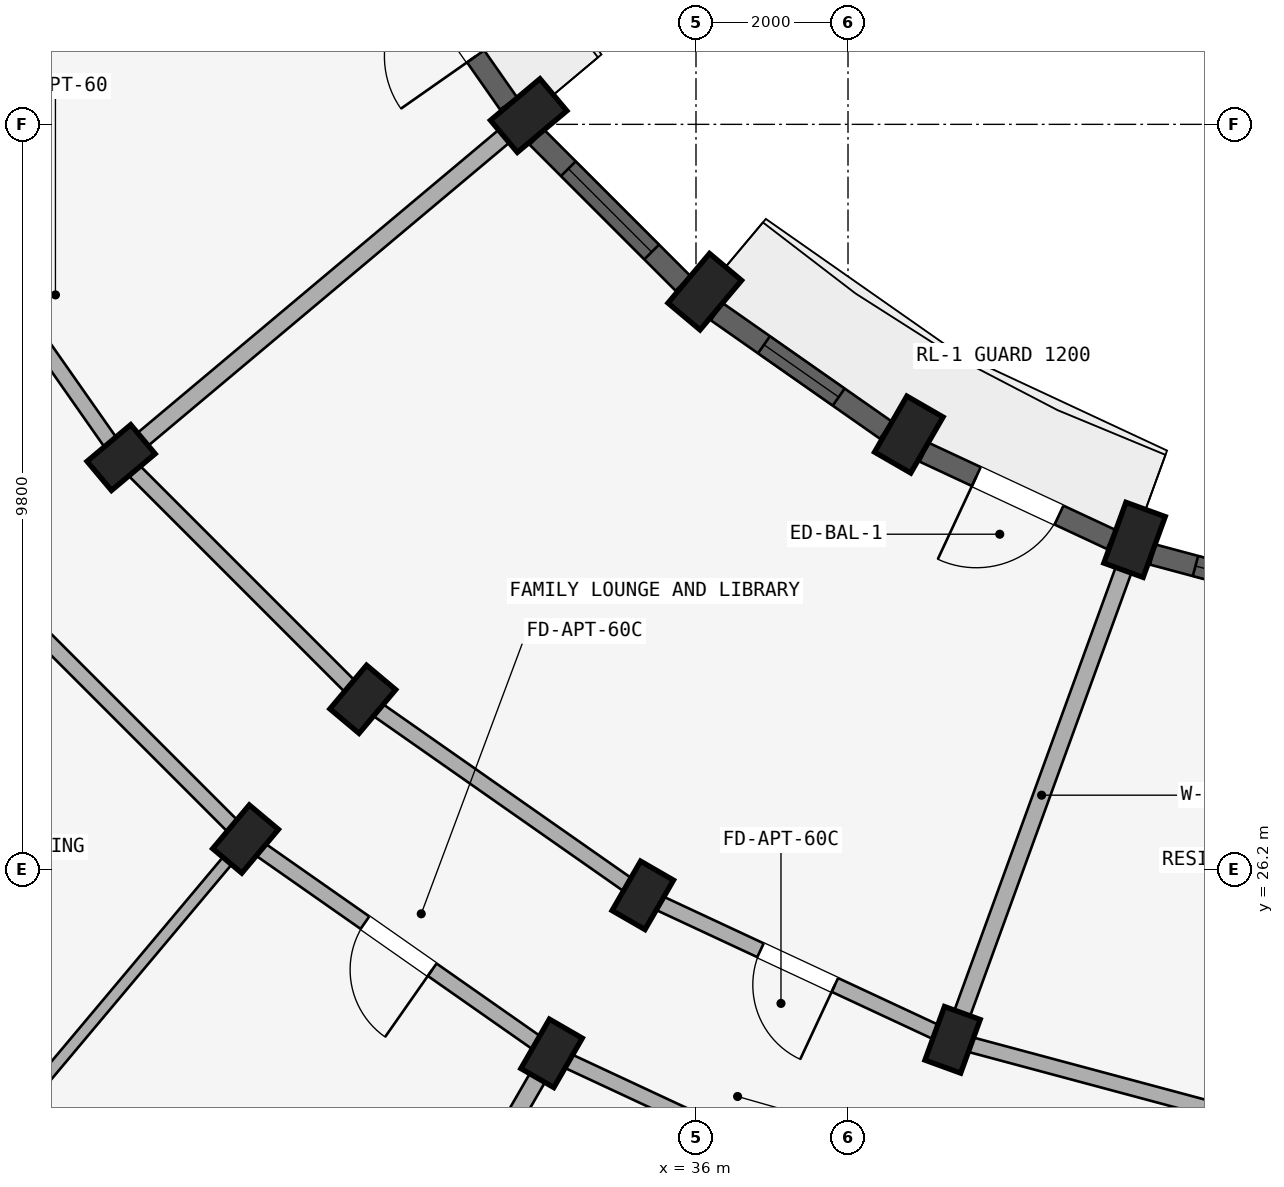
"""IFC4 building model, lengths in metres.
Left out: names, types, materials, properties, quantities, classifications, styles, units other than length and angle.
Written with IfcOpenShell. Run it as: python <this file> out.ifc"""

import sys

from ifc_helpers import new_model, si_unit, direction, frame, frame_2d, origin, origin_2d, place, context, subcontext, project, spatial, rectangle, extrude, element, fill, save


model = new_model("IFC4")
c1 = context("Model", 3, precision=1e-05, world=origin(), true_north=direction((0.0, 1.0)))
c2 = subcontext(c1, "Body", "Model", "MODEL_VIEW")
j1 = project(units=[si_unit("LENGTHUNIT", "METRE"), si_unit("PLANEANGLEUNIT", "RADIAN")], contexts=[c1])
p1 = place(None, origin())
s1 = spatial("IfcSite", under=j1, at=p1, CompositionType="ELEMENT")
p2 = place(p1, origin())
s2 = spatial("IfcBuilding", under=s1, at=p2, CompositionType="ELEMENT")
p3 = place(p2, frame((0.0, 0.0, 8.7)))
s3 = spatial("IfcBuildingStorey", under=s2, at=p3, CompositionType="ELEMENT", Elevation=8.7)
p4 = place(p3, frame((41.77, 30.534, 0.0), z_axis=(0.0, 0.0, 1.0), x_axis=(-0.939692620786, 0.342020143326, 0.0)))
e1 = element("IfcColumn", 1, at=p4, inside=s3, PredefinedType="COLUMN", context=c2, shape_type="SweptSolid", body=[
    extrude(rectangle(XDim=0.55, YDim=0.85, at=origin_2d()), origin(), (0.0, 0.0, 1.0), 2.93),
])
p5 = place(p3, frame((39.376, 23.956, 0.0), z_axis=(0.0, 0.0, 1.0), x_axis=(-0.939692620786, 0.342020143326, 0.0)))
e2 = element("IfcColumn", 2, at=p5, inside=s3, PredefinedType="COLUMN", context=c2, shape_type="SweptSolid", body=[
    extrude(rectangle(XDim=0.5, YDim=0.75, at=origin_2d()), origin(), (0.0, 0.0, 1.0), 2.93),
])
p6 = place(p3, frame((38.8, 31.919, 0.0), z_axis=(0.0, 0.0, 1.0), x_axis=(-0.866025403784, 0.5, 0.0)))
e3 = element("IfcColumn", 3, at=p6, inside=s3, PredefinedType="COLUMN", context=c2, shape_type="SweptSolid", body=[
    extrude(rectangle(XDim=0.55, YDim=0.85, at=origin_2d()), origin(), (0.0, 0.0, 1.0), 2.93),
])
for number, where, z_axis, x_axis in (
    (4, (35.3, 25.856, 0.0), (0.0, 0.0, 1.0), (-0.866, 0.5, 0.0)),
    (5, (34.1, 23.778, 0.0), (0.0, 0.0, 1.0), (-0.866, 0.5, 0.0)),
):
    element("IfcColumn", number, at=place(p3, frame(where, z_axis=z_axis, x_axis=x_axis)), inside=s3, PredefinedType="COLUMN", context=c2, shape_type="SweptSolid", body=[
        extrude(rectangle(XDim=0.5, YDim=0.75, at=origin_2d()), origin(), (0.0, 0.0, 1.0), 2.93),
    ])
p7 = place(p3, frame((36.115, 33.798, 0.0), z_axis=(0.0, 0.0, 1.0), x_axis=(-0.766044443119, 0.642787609687, 0.0)))
e6 = element("IfcColumn", 6, at=p7, inside=s3, PredefinedType="COLUMN", context=c2, shape_type="SweptSolid", body=[
    extrude(rectangle(XDim=0.55, YDim=0.85, at=origin_2d()), origin(), (0.0, 0.0, 1.0), 2.93),
])
for number, where, z_axis, x_axis in (
    (7, (31.616, 28.436, 0.0), (0.0, 0.0, 1.0), (-0.766, 0.643, 0.0)),
    (8, (30.073, 26.598, 0.0), (0.0, 0.0, 1.0), (-0.766, 0.643, 0.0)),
):
    element("IfcColumn", number, at=place(p3, frame(where, z_axis=z_axis, x_axis=x_axis)), inside=s3, PredefinedType="COLUMN", context=c2, shape_type="SweptSolid", body=[
        extrude(rectangle(XDim=0.5, YDim=0.75, at=origin_2d()), origin(), (0.0, 0.0, 1.0), 2.93),
    ])
p8 = place(p3, frame((33.798, 36.115, 0.0), z_axis=(0.0, 0.0, 1.0), x_axis=(-0.642787609687, 0.766044443119, 0.0)))
e9 = element("IfcColumn", 9, at=p8, inside=s3, PredefinedType="COLUMN", context=c2, shape_type="SweptSolid", body=[
    extrude(rectangle(XDim=0.55, YDim=0.85, at=origin_2d()), origin(), (0.0, 0.0, 1.0), 2.93),
])
p9 = place(p3, frame((28.436, 31.616, 0.0), z_axis=(0.0, 0.0, 1.0), x_axis=(-0.642787609687, 0.766044443119, 0.0)))
e10 = element("IfcColumn", 10, at=p9, inside=s3, PredefinedType="COLUMN", context=c2, shape_type="SweptSolid", body=[
    extrude(rectangle(XDim=0.5, YDim=0.75, at=origin_2d()), origin(), (0.0, 0.0, 1.0), 2.93),
])
p10 = place(p3, frame((43.72, 22.792, 0.0), z_axis=(0.0, 0.0, 1.0), x_axis=(-0.965934240054, 0.258787642463, 0.0)))
e11 = element("IfcWall", 11, at=p10, inside=s3, PredefinedType="STANDARD", context=c2, shape_type="SweptSolid", body=[
    extrude(rectangle(XDim=4.497, YDim=0.2, at=frame_2d((2.249, 0.0))), origin(), (0.0, 0.0, 1.0), 2.372),
])
p11 = place(p3, frame((39.376, 23.956, 0.0), z_axis=(0.0, 0.0, 1.0), x_axis=(-0.906307919131, 0.422617978463, 0.0)))
e12 = element("IfcWall", 12, at=p11, inside=s3, PredefinedType="STANDARD", context=c2, shape_type="SweptSolid", body=[
    extrude(rectangle(XDim=4.497, YDim=0.2, at=frame_2d((2.249, 0.0))), origin(), (0.0, 0.0, 1.0), 2.372),
])
p12 = place(p11, frame((1.709, 0.0, 0.0)))
e13 = element("IfcOpeningElement", 13, at=p12, cuts=e12, PredefinedType="OPENING", context=c2, shape_type="SweptSolid", body=[
    extrude(rectangle(XDim=1.08, YDim=2.15, at=frame_2d((0.54, 1.075))), frame((0.0, 0.11, 0.0), z_axis=(0.0, -1.0, 0.0), x_axis=(1.0, 0.0, 0.0)), (0.0, 0.0, 1.0), 0.22),
])
p13 = place(p3, frame((38.555, 21.701, 0.0), z_axis=(0.0, 0.0, 1.0), x_axis=(-0.906302381024, 0.422629854778, 0.0)))
e14 = element("IfcWall", 14, at=p13, inside=s3, PredefinedType="STANDARD", context=c2, shape_type="SweptSolid", body=[
    extrude(rectangle(XDim=4.915, YDim=0.2, at=frame_2d((2.458, 0.0))), origin(), (0.0, 0.0, 1.0), 2.372),
])
p14 = place(p13, frame((1.938, 0.0, 0.0)))
e15 = element("IfcOpeningElement", 15, at=p14, cuts=e14, PredefinedType="OPENING", context=c2, shape_type="SweptSolid", body=[
    extrude(rectangle(XDim=1.04, YDim=2.15, at=frame_2d((0.52, 1.075))), frame((0.0, 0.11, 0.0), z_axis=(0.0, -1.0, 0.0), x_axis=(1.0, 0.0, 0.0)), (0.0, 0.0, 1.0), 0.22),
])
p15 = place(p3, frame((35.3, 25.856, 0.0), z_axis=(0.0, 0.0, 1.0), x_axis=(-0.819155404658, 0.573571637217, 0.0)))
e16 = element("IfcWall", 16, at=p15, inside=s3, PredefinedType="STANDARD", context=c2, shape_type="SweptSolid", body=[
    extrude(rectangle(XDim=4.497, YDim=0.2, at=frame_2d((2.249, 0.0))), origin(), (0.0, 0.0, 1.0), 2.372),
])
p16 = place(p3, frame((34.1, 23.778, 0.0), z_axis=(0.0, 0.0, 1.0), x_axis=(-0.819140911474, 0.573592335331, 0.0)))
e17 = element("IfcWall", 17, at=p16, inside=s3, PredefinedType="STANDARD", context=c2, shape_type="SweptSolid", body=[
    extrude(rectangle(XDim=4.916, YDim=0.2, at=frame_2d((2.458, 0.0))), origin(), (0.0, 0.0, 1.0), 2.372),
])
p17 = place(p16, frame((1.918, 0.0, 0.0)))
e18 = element("IfcOpeningElement", 18, at=p17, cuts=e17, PredefinedType="OPENING", context=c2, shape_type="SweptSolid", body=[
    extrude(rectangle(XDim=1.08, YDim=2.15, at=frame_2d((0.54, 1.075))), frame((0.0, 0.11, 0.0), z_axis=(0.0, -1.0, 0.0), x_axis=(1.0, 0.0, 0.0)), (0.0, 0.0, 1.0), 0.22),
])
p18 = place(p3, frame((31.616, 28.436, 0.0), z_axis=(0.0, 0.0, 1.0), x_axis=(-0.707106781187, 0.707106781187, 0.0)))
e19 = element("IfcWall", 19, at=p18, inside=s3, PredefinedType="STANDARD", context=c2, shape_type="SweptSolid", body=[
    extrude(rectangle(XDim=4.497, YDim=0.2, at=frame_2d((2.249, 0.0))), origin(), (0.0, 0.0, 1.0), 2.372),
])
p19 = place(p3, frame((30.073, 26.598, 0.0), z_axis=(0.0, 0.0, 1.0), x_axis=(-0.707106781187, 0.707106781187, 0.0)))
e20 = element("IfcWall", 20, at=p19, inside=s3, PredefinedType="STANDARD", context=c2, shape_type="SweptSolid", body=[
    extrude(rectangle(XDim=4.916, YDim=0.2, at=frame_2d((2.458, 0.0))), origin(), (0.0, 0.0, 1.0), 2.372),
])
p20 = place(p3, frame((28.436, 31.616, 0.0), z_axis=(0.0, 0.0, 1.0), x_axis=(-0.573571637217, 0.819155404658, 0.0)))
e21 = element("IfcWall", 21, at=p20, inside=s3, PredefinedType="STANDARD", context=c2, shape_type="SweptSolid", body=[
    extrude(rectangle(XDim=4.497, YDim=0.2, at=frame_2d((2.249, 0.0))), origin(), (0.0, 0.0, 1.0), 2.372),
])
p21 = place(p20, frame((1.749, 0.0, 0.0)))
e22 = element("IfcOpeningElement", 22, at=p21, cuts=e21, PredefinedType="OPENING", context=c2, shape_type="SweptSolid", body=[
    extrude(rectangle(XDim=1.0, YDim=2.15, at=frame_2d((0.5, 1.075))), frame((0.0, 0.11, 0.0), z_axis=(0.0, -1.0, 0.0), x_axis=(1.0, 0.0, 0.0)), (0.0, 0.0, 1.0), 0.22),
])
p22 = place(p3, frame((41.702, 30.346, 0.0), z_axis=(0.0, 0.0, 1.0), x_axis=(-0.342010221662, -0.939696231917, 0.0)))
e23 = element("IfcWall", 23, at=p22, inside=s3, PredefinedType="STANDARD", context=c2, shape_type="SweptSolid", body=[
    extrude(rectangle(XDim=6.75, YDim=0.22, at=frame_2d((3.375, 0.0))), origin(), (0.0, 0.0, 1.0), 2.372),
])
p23 = place(p3, frame((34.05, 23.691, 0.0), z_axis=(0.0, 0.0, 1.0), x_axis=(-0.499997843263, -0.866026648973, 0.0)))
e24 = element("IfcWall", 24, at=p23, inside=s3, PredefinedType="STANDARD", context=c2, shape_type="SweptSolid", body=[
    extrude(rectangle(XDim=17.42, YDim=0.23, at=frame_2d((8.71, 0.0))), origin(), (0.0, 0.0, 1.0), 2.372),
])
p24 = place(p3, frame((30.009, 26.521, 0.0), z_axis=(0.0, 0.0, 1.0), x_axis=(-0.642784757967, -0.766046835987, 0.0)))
e25 = element("IfcWall", 25, at=p24, inside=s3, PredefinedType="PARTITIONING", context=c2, shape_type="SweptSolid", body=[
    extrude(rectangle(XDim=17.42, YDim=0.15, at=frame_2d((8.71, 0.0))), origin(), (0.0, 0.0, 1.0), 2.372),
])
p25 = place(p24, frame((4.45, 0.0, 0.0)))
e26 = element("IfcOpeningElement", 26, at=p25, cuts=e25, PredefinedType="OPENING", context=c2, shape_type="SweptSolid", body=[
    extrude(rectangle(XDim=0.8, YDim=2.1, at=frame_2d((0.4, 1.05))), frame((0.0, 0.085, 0.0), z_axis=(0.0, -1.0, 0.0), x_axis=(1.0, 0.0, 0.0)), (0.0, 0.0, 1.0), 0.17),
])
p26 = place(p3, frame((33.645, 35.987, 0.0), z_axis=(0.0, 0.0, 1.0), x_axis=(-0.766046761698, -0.642784846501, 0.0)))
e27 = element("IfcWall", 27, at=p26, inside=s3, PredefinedType="STANDARD", context=c2, shape_type="SweptSolid", body=[
    extrude(rectangle(XDim=6.75, YDim=0.22, at=frame_2d((3.375, 0.0))), origin(), (0.0, 0.0, 1.0), 2.372),
])
p27 = place(p3, frame((44.633, 29.637, 0.0), z_axis=(0.0, 0.0, 1.0), x_axis=(-0.965925595341, 0.258819907011, 0.0)))
e28 = element("IfcWall", 28, at=p27, inside=s3, PredefinedType="STANDARD", context=c2, shape_type="SweptSolid", body=[
    extrude(rectangle(XDim=2.718, YDim=0.275, at=frame_2d((1.359, 0.0))), origin(), (0.0, 0.0, 1.0), 2.472),
])
p28 = place(p27, frame((0.584, 0.0, 0.672)))
e29 = element("IfcOpeningElement", 29, at=p28, cuts=e28, PredefinedType="OPENING", context=c2, shape_type="SweptSolid", body=[
    extrude(rectangle(XDim=1.55, YDim=1.6, at=frame_2d((0.775, 0.8))), frame((0.0, 0.147, 0.0), z_axis=(0.0, -1.0, 0.0), x_axis=(1.0, 0.0, 0.0)), (0.0, 0.0, 1.0), 0.295),
])
p29 = place(p3, frame((41.464, 30.539, 0.0), z_axis=(0.0, 0.0, 1.0), x_axis=(-0.906311629168, 0.422610022166, 0.0)))
e30 = element("IfcWall", 30, at=p29, inside=s3, PredefinedType="STANDARD", context=c2, shape_type="SweptSolid", body=[
    extrude(rectangle(XDim=2.718, YDim=0.275, at=frame_2d((1.359, 0.0))), origin(), (0.0, 0.0, 1.0), 2.472),
])
p30 = place(p29, frame((0.759, 0.0, 0.0)))
e31 = element("IfcOpeningElement", 31, at=p30, cuts=e30, PredefinedType="OPENING", context=c2, shape_type="SweptSolid", body=[
    extrude(rectangle(XDim=1.2, YDim=2.15, at=frame_2d((0.6, 1.075))), frame((0.0, 0.147, 0.0), z_axis=(0.0, -1.0, 0.0), x_axis=(1.0, 0.0, 0.0)), (0.0, 0.0, 1.0), 0.295),
])
p31 = place(p3, frame((38.499, 31.977, 0.0), z_axis=(0.0, 0.0, 1.0), x_axis=(-0.81917282593, 0.573546755948, 0.0)))
e32 = element("IfcWall", 32, at=p31, inside=s3, PredefinedType="STANDARD", context=c2, shape_type="SweptSolid", body=[
    extrude(rectangle(XDim=2.718, YDim=0.275, at=frame_2d((1.359, 0.0))), origin(), (0.0, 0.0, 1.0), 2.472),
])
p32 = place(p31, frame((0.759, 0.0, 0.772)))
e33 = element("IfcOpeningElement", 33, at=p32, cuts=e32, PredefinedType="OPENING", context=c2, shape_type="SweptSolid", body=[
    extrude(rectangle(XDim=1.2, YDim=1.5, at=frame_2d((0.6, 0.75))), frame((0.0, 0.147, 0.0), z_axis=(0.0, -1.0, 0.0), x_axis=(1.0, 0.0, 0.0)), (0.0, 0.0, 1.0), 0.295),
])
p33 = place(p3, frame((35.829, 33.908, 0.0), z_axis=(0.0, 0.0, 1.0), x_axis=(-0.707106781187, 0.707106781187, 0.0)))
e34 = element("IfcWall", 34, at=p33, inside=s3, PredefinedType="STANDARD", context=c2, shape_type="SweptSolid", body=[
    extrude(rectangle(XDim=2.718, YDim=0.275, at=frame_2d((1.359, 0.0))), origin(), (0.0, 0.0, 1.0), 2.472),
])
p34 = place(p33, frame((0.584, 0.0, 0.672)))
e35 = element("IfcOpeningElement", 35, at=p34, cuts=e34, PredefinedType="OPENING", context=c2, shape_type="SweptSolid", body=[
    extrude(rectangle(XDim=1.55, YDim=1.6, at=frame_2d((0.775, 0.8))), frame((0.0, 0.147, 0.0), z_axis=(0.0, -1.0, 0.0), x_axis=(1.0, 0.0, 0.0)), (0.0, 0.0, 1.0), 0.295),
])
p35 = place(p3, frame((33.535, 36.273, 0.0), z_axis=(0.0, 0.0, 1.0), x_axis=(-0.573546755948, 0.81917282593, 0.0)))
e36 = element("IfcWall", 36, at=p35, inside=s3, PredefinedType="STANDARD", context=c2, shape_type="SweptSolid", body=[
    extrude(rectangle(XDim=2.718, YDim=0.275, at=frame_2d((1.359, 0.0))), origin(), (0.0, 0.0, 1.0), 2.472),
])
p36 = place(p35, frame((0.759, 0.0, 0.0)))
e37 = element("IfcOpeningElement", 37, at=p36, cuts=e36, PredefinedType="OPENING", context=c2, shape_type="SweptSolid", body=[
    extrude(rectangle(XDim=1.2, YDim=2.15, at=frame_2d((0.6, 1.075))), frame((0.0, 0.147, 0.0), z_axis=(0.0, -1.0, 0.0), x_axis=(1.0, 0.0, 0.0)), (0.0, 0.0, 1.0), 0.295),
])
p37 = place(p28, origin())
e38 = element("IfcWindow", 38, at=p37, inside=s3, PartitioningType="DOUBLE_PANEL_VERTICAL", PredefinedType="WINDOW", context=c2, shape_type="SweptSolid", body=[
    extrude(rectangle(XDim=1.55, YDim=1.6, at=frame_2d((0.775, 0.8))), frame((0.0, 0.03, 0.0), z_axis=(0.0, -1.0, 0.0), x_axis=(1.0, 0.0, 0.0)), (0.0, 0.0, 1.0), 0.06),
])
fill(e29, e38)
p38 = place(p32, origin())
e39 = element("IfcWindow", 39, at=p38, inside=s3, PartitioningType="SINGLE_PANEL", PredefinedType="WINDOW", context=c2, shape_type="SweptSolid", body=[
    extrude(rectangle(XDim=1.2, YDim=1.5, at=frame_2d((0.6, 0.75))), frame((0.0, 0.03, 0.0), z_axis=(0.0, -1.0, 0.0), x_axis=(1.0, 0.0, 0.0)), (0.0, 0.0, 1.0), 0.06),
])
fill(e33, e39)
p39 = place(p34, origin())
e40 = element("IfcWindow", 40, at=p39, inside=s3, PartitioningType="DOUBLE_PANEL_VERTICAL", PredefinedType="WINDOW", context=c2, shape_type="SweptSolid", body=[
    extrude(rectangle(XDim=1.55, YDim=1.6, at=frame_2d((0.775, 0.8))), frame((0.0, 0.03, 0.0), z_axis=(0.0, -1.0, 0.0), x_axis=(1.0, 0.0, 0.0)), (0.0, 0.0, 1.0), 0.06),
])
fill(e35, e40)
p40 = place(p17, origin())
e41 = element("IfcDoor", 41, at=p40, inside=s3, OperationType="SINGLE_SWING_LEFT", PredefinedType="DOOR", context=c2, shape_type="SweptSolid", body=[
    extrude(rectangle(XDim=1.08, YDim=2.15, at=frame_2d((0.54, 1.075))), frame((0.0, 0.025, 0.0), z_axis=(0.0, -1.0, 0.0), x_axis=(1.0, 0.0, 0.0)), (0.0, 0.0, 1.0), 0.05),
])
fill(e18, e41)
p41 = place(p12, frame((1.08, 0.0, 0.0), z_axis=(0.0, 0.0, 1.0), x_axis=(-1.0, 0.0, 0.0)))
e42 = element("IfcDoor", 42, at=p41, inside=s3, OperationType="SINGLE_SWING_RIGHT", PredefinedType="DOOR", context=c2, shape_type="SweptSolid", body=[
    extrude(rectangle(XDim=1.08, YDim=2.15, at=frame_2d((0.54, 1.075))), frame((0.0, 0.025, 0.0), z_axis=(0.0, -1.0, 0.0), x_axis=(1.0, 0.0, 0.0)), (0.0, 0.0, 1.0), 0.05),
])
fill(e13, e42)
p42 = place(p30, frame((1.2, 0.0, 0.0), z_axis=(0.0, 0.0, 1.0), x_axis=(-1.0, 0.0, 0.0)))
e43 = element("IfcDoor", 43, at=p42, inside=s3, OperationType="SINGLE_SWING_LEFT", PredefinedType="DOOR", context=c2, shape_type="SweptSolid", body=[
    extrude(rectangle(XDim=1.2, YDim=2.15, at=frame_2d((0.6, 1.075))), frame((0.0, 0.025, 0.0), z_axis=(0.0, -1.0, 0.0), x_axis=(1.0, 0.0, 0.0)), (0.0, 0.0, 1.0), 0.05),
])
fill(e31, e43)
p43 = place(p36, frame((1.2, 0.0, 0.0), z_axis=(0.0, 0.0, 1.0), x_axis=(-1.0, 0.0, 0.0)))
e44 = element("IfcDoor", 44, at=p43, inside=s3, OperationType="SINGLE_SWING_RIGHT", PredefinedType="DOOR", context=c2, shape_type="SweptSolid", body=[
    extrude(rectangle(XDim=1.2, YDim=2.15, at=frame_2d((0.6, 1.075))), frame((0.0, 0.025, 0.0), z_axis=(0.0, -1.0, 0.0), x_axis=(1.0, 0.0, 0.0)), (0.0, 0.0, 1.0), 0.05),
])
fill(e37, e44)
save(model, sys.argv[1])
